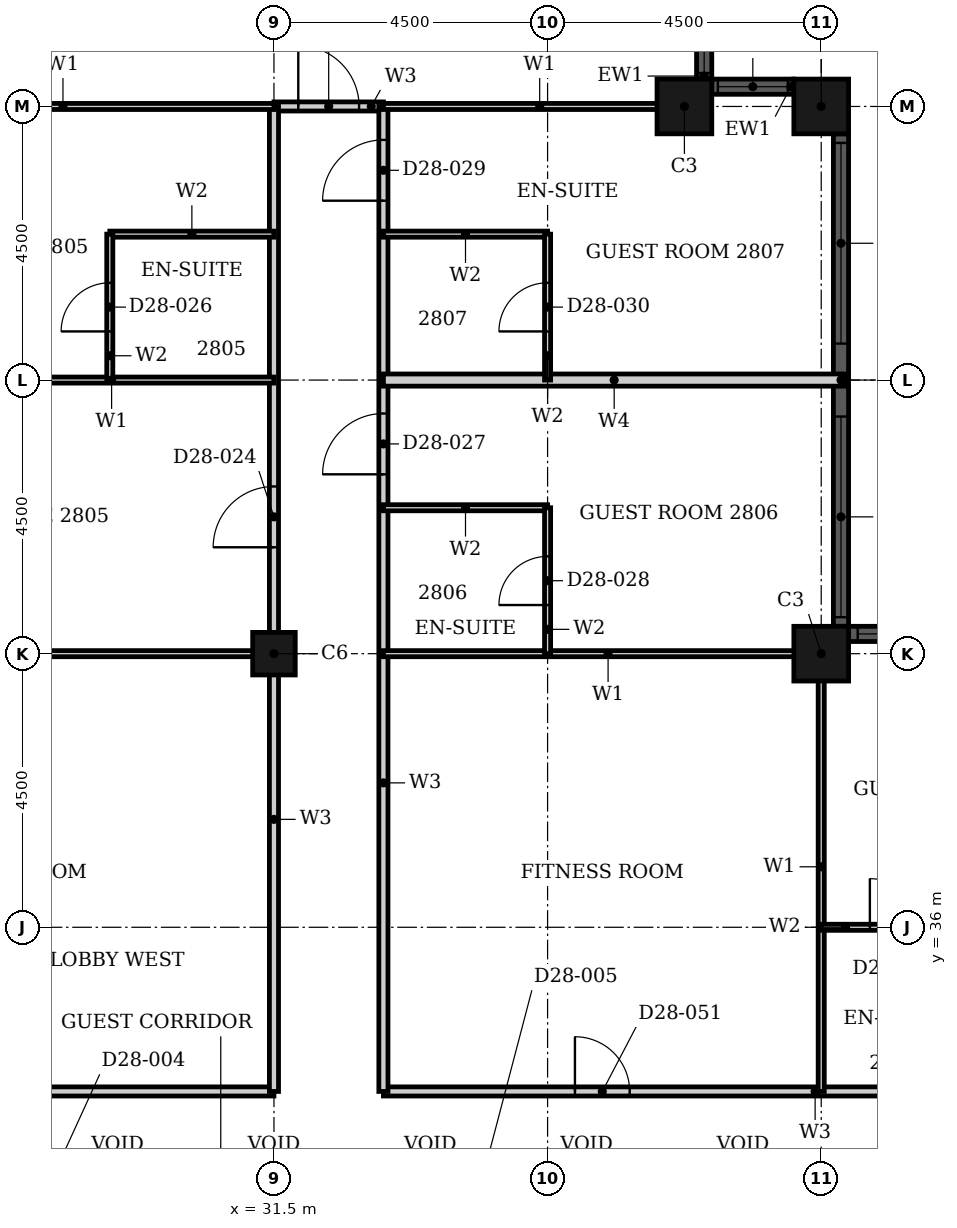
"""IFC4 building model, lengths in metres.
Left out: names, types, materials, properties, quantities, classifications, styles, units other than length and angle.
Written with IfcOpenShell. Run it as: python <this file> out.ifc"""

import sys

from ifc_helpers import new_model, si_unit, direction, frame, frame_2d, origin, origin_2d, place, context, subcontext, project, spatial, rectangle, hollow_rectangle, extrude, element, fill, save


model = new_model("IFC4")
c1 = context("Model", 3, precision=1e-05, world=origin(), true_north=direction((0.0, 1.0)))
c2 = subcontext(c1, "Body", "Model", "MODEL_VIEW")
j1 = project(units=[si_unit("LENGTHUNIT", "METRE"), si_unit("PLANEANGLEUNIT", "RADIAN")], contexts=[c1])
p1 = place(None, origin())
s1 = spatial("IfcSite", under=j1, at=p1, CompositionType="ELEMENT")
p2 = place(p1, origin())
s2 = spatial("IfcBuilding", under=s1, at=p2, CompositionType="ELEMENT")
p3 = place(p2, frame((0.0, 0.0, 115.2)))
s3 = spatial("IfcBuildingStorey", under=s2, at=p3, CompositionType="ELEMENT", Elevation=115.2)
for number, where, z_axis, x_axis in (
    (1, (40.5, 40.5, 0.0), (0.0, 0.0, 1.0), (1.0, 0.0, 0.0)),
    (2, (40.5, 49.5, 0.0), (0.0, 0.0, 1.0), (1.0, 0.0, 0.0)),
    (3, (38.25, 49.5, 0.0), (0.0, 0.0, 1.0), (1.0, 0.0, 0.0)),
):
    element("IfcColumn", number, at=place(p3, frame(where, z_axis=z_axis, x_axis=x_axis)), inside=s3, PredefinedType="COLUMN", context=c2, shape_type="SweptSolid", body=[
        extrude(hollow_rectangle(XDim=0.9, YDim=0.9, WallThickness=0.028, at=origin_2d()), origin(), (0.0, 0.0, 1.0), 3.6),
    ])
p4 = place(p3, frame((31.5, 40.5, 0.0), z_axis=(0.0, 0.0, 1.0), x_axis=(1.0, 0.0, 0.0)))
e4 = element("IfcColumn", 4, at=p4, inside=s3, PredefinedType="COLUMN", context=c2, shape_type="SweptSolid", body=[
    extrude(hollow_rectangle(XDim=0.7, YDim=0.7, WallThickness=0.022, at=origin_2d()), origin(), (0.0, 0.0, 1.0), 3.6),
])
p5 = place(p3, frame((44.55, 40.825, 0.0), z_axis=(0.0, 0.0, 1.0), x_axis=(-1.0, 0.0, 0.0)))
e5 = element("IfcWall", 5, at=p5, inside=s3, PredefinedType="SOLIDWALL", context=c2, shape_type="SweptSolid", body=[
    extrude(rectangle(XDim=3.6, YDim=0.25, at=frame_2d((1.8, 0.0))), origin(), (0.0, 0.0, 1.0), 3.6),
])
p6 = place(p5, frame((0.15, 0.0, 0.9)))
e6 = element("IfcOpeningElement", 6, at=p6, cuts=e5, PredefinedType="OPENING", context=c2, shape_type="SweptSolid", body=[
    extrude(rectangle(XDim=3.3, YDim=2.08, at=frame_2d((1.65, 1.04))), frame((0.0, 0.135, 0.0), z_axis=(0.0, -1.0, 0.0), x_axis=(1.0, 0.0, 0.0)), (0.0, 0.0, 1.0), 0.27),
])
p7 = place(p3, frame((40.825, 40.95, 0.0), z_axis=(0.0, 0.0, 1.0), x_axis=(0.0, 1.0, 0.0)))
e7 = element("IfcWall", 7, at=p7, inside=s3, PredefinedType="SOLIDWALL", context=c2, shape_type="SweptSolid", body=[
    extrude(rectangle(XDim=8.1, YDim=0.25, at=frame_2d((4.05, 0.0))), origin(), (0.0, 0.0, 1.0), 3.6),
])
p8 = place(p7, frame((0.15, 0.0, 0.9)))
e8 = element("IfcOpeningElement", 8, at=p8, cuts=e7, PredefinedType="OPENING", context=c2, shape_type="SweptSolid", body=[
    extrude(rectangle(XDim=3.3, YDim=2.08, at=frame_2d((1.65, 1.04))), frame((0.0, 0.135, 0.0), z_axis=(0.0, -1.0, 0.0), x_axis=(1.0, 0.0, 0.0)), (0.0, 0.0, 1.0), 0.27),
])
p9 = place(p7, frame((4.65, 0.0, 0.9)))
e9 = element("IfcOpeningElement", 9, at=p9, cuts=e7, PredefinedType="OPENING", context=c2, shape_type="SweptSolid", body=[
    extrude(rectangle(XDim=3.3, YDim=2.08, at=frame_2d((1.65, 1.04))), frame((0.0, 0.135, 0.0), z_axis=(0.0, -1.0, 0.0), x_axis=(1.0, 0.0, 0.0)), (0.0, 0.0, 1.0), 0.27),
])
p10 = place(p3, frame((40.05, 49.825, 0.0), z_axis=(0.0, 0.0, 1.0), x_axis=(-1.0, 0.0, 0.0)))
e10 = element("IfcWall", 10, at=p10, inside=s3, PredefinedType="SOLIDWALL", context=c2, shape_type="SweptSolid", body=[
    extrude(rectangle(XDim=1.35, YDim=0.25, at=frame_2d((0.675, 0.0))), origin(), (0.0, 0.0, 1.0), 3.6),
])
p11 = place(p10, frame((0.1, 0.0, 0.9)))
e11 = element("IfcOpeningElement", 11, at=p11, cuts=e10, PredefinedType="OPENING", context=c2, shape_type="SweptSolid", body=[
    extrude(rectangle(XDim=1.15, YDim=2.08, at=frame_2d((0.575, 1.04))), frame((0.0, 0.135, 0.0), z_axis=(0.0, -1.0, 0.0), x_axis=(1.0, 0.0, 0.0)), (0.0, 0.0, 1.0), 0.27),
])
p12 = place(p3, frame((38.575, 49.95, 0.0), z_axis=(0.0, 0.0, 1.0), x_axis=(0.0, 1.0, 0.0)))
e12 = element("IfcWall", 12, at=p12, inside=s3, PredefinedType="SOLIDWALL", context=c2, shape_type="SweptSolid", body=[
    extrude(rectangle(XDim=1.35, YDim=0.25, at=frame_2d((0.675, 0.0))), origin(), (0.0, 0.0, 1.0), 3.6),
])
p13 = place(p12, frame((0.1, 0.0, 0.9)))
e13 = element("IfcOpeningElement", 13, at=p13, cuts=e12, PredefinedType="OPENING", context=c2, shape_type="SweptSolid", body=[
    extrude(rectangle(XDim=1.15, YDim=2.08, at=frame_2d((0.575, 1.04))), frame((0.0, 0.135, 0.0), z_axis=(0.0, -1.0, 0.0), x_axis=(1.0, 0.0, 0.0)), (0.0, 0.0, 1.0), 0.27),
])
p14 = place(p3, frame((33.3, 33.3, 0.0), z_axis=(0.0, 0.0, 1.0), x_axis=(1.0, 0.0, 0.0)))
e14 = element("IfcWall", 14, at=p14, inside=s3, PredefinedType="PARTITIONING", context=c2, shape_type="SweptSolid", body=[
    extrude(rectangle(XDim=11.7, YDim=0.15, at=frame_2d((5.85, 0.0))), origin(), (0.0, 0.0, 1.0), 3.3),
])
p15 = place(p14, frame((10.15, 0.0, 0.0)))
e15 = element("IfcOpeningElement", 15, at=p15, cuts=e14, PredefinedType="OPENING", context=c2, shape_type="SweptSolid", body=[
    extrude(rectangle(XDim=1.0, YDim=2.1, at=frame_2d((0.5, 1.05))), frame((0.0, 0.085, 0.0), z_axis=(0.0, -1.0, 0.0), x_axis=(1.0, 0.0, 0.0)), (0.0, 0.0, 1.0), 0.17),
])
p16 = place(p14, frame((3.15, 0.0, 0.0)))
e16 = element("IfcOpeningElement", 16, at=p16, cuts=e14, PredefinedType="OPENING", context=c2, shape_type="SweptSolid", body=[
    extrude(rectangle(XDim=0.9, YDim=2.1, at=frame_2d((0.45, 1.05))), frame((0.0, 0.085, 0.0), z_axis=(0.0, -1.0, 0.0), x_axis=(1.0, 0.0, 0.0)), (0.0, 0.0, 1.0), 0.17),
])
p17 = place(p3, frame((16.2, 33.3, 0.0), z_axis=(0.0, 0.0, 1.0), x_axis=(1.0, 0.0, 0.0)))
e17 = element("IfcWall", 17, at=p17, inside=s3, PredefinedType="PARTITIONING", context=c2, shape_type="SweptSolid", body=[
    extrude(rectangle(XDim=15.3, YDim=0.15, at=frame_2d((7.65, 0.0))), origin(), (0.0, 0.0, 1.0), 3.3),
])
p18 = place(p17, frame((4.75, 0.0, 0.0)))
e18 = element("IfcOpeningElement", 18, at=p18, cuts=e17, PredefinedType="OPENING", context=c2, shape_type="SweptSolid", body=[
    extrude(rectangle(XDim=1.0, YDim=2.1, at=frame_2d((0.5, 1.05))), frame((0.0, 0.085, 0.0), z_axis=(0.0, -1.0, 0.0), x_axis=(1.0, 0.0, 0.0)), (0.0, 0.0, 1.0), 0.17),
])
p19 = place(p17, frame((0.45, 0.0, 0.0)))
e19 = element("IfcOpeningElement", 19, at=p19, cuts=e17, PredefinedType="OPENING", context=c2, shape_type="SweptSolid", body=[
    extrude(rectangle(XDim=0.9, YDim=2.1, at=frame_2d((0.45, 1.05))), frame((0.0, 0.085, 0.0), z_axis=(0.0, -1.0, 0.0), x_axis=(1.0, 0.0, 0.0)), (0.0, 0.0, 1.0), 0.17),
])
p20 = place(p17, frame((10.35, 0.0, 0.0)))
e20 = element("IfcOpeningElement", 20, at=p20, cuts=e17, PredefinedType="OPENING", context=c2, shape_type="SweptSolid", body=[
    extrude(rectangle(XDim=0.9, YDim=2.1, at=frame_2d((0.45, 1.05))), frame((0.0, 0.085, 0.0), z_axis=(0.0, -1.0, 0.0), x_axis=(1.0, 0.0, 0.0)), (0.0, 0.0, 1.0), 0.17),
])
p21 = place(p3, frame((31.5, 49.5, 0.0), z_axis=(0.0, 0.0, 1.0), x_axis=(1.0, 0.0, 0.0)))
e21 = element("IfcWall", 21, at=p21, inside=s3, PredefinedType="PARTITIONING", context=c2, shape_type="SweptSolid", body=[
    extrude(rectangle(XDim=1.8, YDim=0.15, at=frame_2d((0.9, 0.0))), origin(), (0.0, 0.0, 1.0), 3.3),
])
p22 = place(p21, frame((0.4, 0.0, 0.0)))
e22 = element("IfcOpeningElement", 22, at=p22, cuts=e21, PredefinedType="OPENING", context=c2, shape_type="SweptSolid", body=[
    extrude(rectangle(XDim=1.0, YDim=2.1, at=frame_2d((0.5, 1.05))), frame((0.0, 0.085, 0.0), z_axis=(0.0, -1.0, 0.0), x_axis=(1.0, 0.0, 0.0)), (0.0, 0.0, 1.0), 0.17),
])
p23 = place(p3, frame((31.5, 33.3, 0.0), z_axis=(0.0, 0.0, 1.0), x_axis=(0.0, 1.0, 0.0)))
e23 = element("IfcWall", 23, at=p23, inside=s3, PredefinedType="PARTITIONING", context=c2, shape_type="SweptSolid", body=[
    extrude(rectangle(XDim=16.2, YDim=0.15, at=frame_2d((8.1, 0.0))), origin(), (0.0, 0.0, 1.0), 2.58),
])
p24 = place(p23, frame((8.95, 0.0, 0.0)))
e24 = element("IfcOpeningElement", 24, at=p24, cuts=e23, PredefinedType="OPENING", context=c2, shape_type="SweptSolid", body=[
    extrude(rectangle(XDim=1.0, YDim=2.1, at=frame_2d((0.5, 1.05))), frame((0.0, 0.085, 0.0), z_axis=(0.0, -1.0, 0.0), x_axis=(1.0, 0.0, 0.0)), (0.0, 0.0, 1.0), 0.17),
])
p25 = place(p3, frame((33.3, 33.3, 0.0), z_axis=(0.0, 0.0, 1.0), x_axis=(0.0, 1.0, 0.0)))
e25 = element("IfcWall", 25, at=p25, inside=s3, PredefinedType="PARTITIONING", context=c2, shape_type="SweptSolid", body=[
    extrude(rectangle(XDim=16.2, YDim=0.15, at=frame_2d((8.1, 0.0))), origin(), (0.0, 0.0, 1.0), 3.3),
])
p26 = place(p25, frame((10.15, 0.0, 0.0)))
e26 = element("IfcOpeningElement", 26, at=p26, cuts=e25, PredefinedType="OPENING", context=c2, shape_type="SweptSolid", body=[
    extrude(rectangle(XDim=1.0, YDim=2.1, at=frame_2d((0.5, 1.05))), frame((0.0, 0.085, 0.0), z_axis=(0.0, -1.0, 0.0), x_axis=(1.0, 0.0, 0.0)), (0.0, 0.0, 1.0), 0.17),
])
p27 = place(p25, frame((14.65, 0.0, 0.0)))
e27 = element("IfcOpeningElement", 27, at=p27, cuts=e25, PredefinedType="OPENING", context=c2, shape_type="SweptSolid", body=[
    extrude(rectangle(XDim=1.0, YDim=2.1, at=frame_2d((0.5, 1.05))), frame((0.0, 0.085, 0.0), z_axis=(0.0, -1.0, 0.0), x_axis=(1.0, 0.0, 0.0)), (0.0, 0.0, 1.0), 0.17),
])
p28 = place(p3, frame((33.3, 40.5, 0.0), z_axis=(0.0, 0.0, 1.0), x_axis=(1.0, 0.0, 0.0)))
e28 = element("IfcWall", 28, at=p28, inside=s3, PredefinedType="PARTITIONING", context=c2, shape_type="SweptSolid", body=[
    extrude(rectangle(XDim=7.39, YDim=0.1, at=frame_2d((3.695, 0.0))), origin(), (0.0, 0.0, 1.0), 2.38),
])
p29 = place(p3, frame((22.31, 40.5, 0.0), z_axis=(0.0, 0.0, 1.0), x_axis=(1.0, 0.0, 0.0)))
e29 = element("IfcWall", 29, at=p29, inside=s3, PredefinedType="PARTITIONING", context=c2, shape_type="SweptSolid", body=[
    extrude(rectangle(XDim=9.19, YDim=0.1, at=frame_2d((4.595, 0.0))), origin(), (0.0, 0.0, 1.0), 2.38),
])
p30 = place(p3, frame((22.11, 45.0, 0.0), z_axis=(0.0, 0.0, 1.0), x_axis=(1.0, 0.0, 0.0)))
e30 = element("IfcWall", 30, at=p30, inside=s3, PredefinedType="PARTITIONING", context=c2, shape_type="SweptSolid", body=[
    extrude(rectangle(XDim=9.39, YDim=0.1, at=frame_2d((4.695, 0.0))), origin(), (0.0, 0.0, 1.0), 3.3),
])
p31 = place(p30, frame((3.15, 0.0, 0.0)))
e31 = element("IfcOpeningElement", 31, at=p31, cuts=e30, PredefinedType="OPENING", context=c2, shape_type="SweptSolid", body=[
    extrude(rectangle(XDim=0.9, YDim=2.1, at=frame_2d((0.45, 1.05))), frame((0.0, 0.06, 0.0), z_axis=(0.0, -1.0, 0.0), x_axis=(1.0, 0.0, 0.0)), (0.0, 0.0, 1.0), 0.12),
])
p32 = place(p3, frame((33.3, 49.5, 0.0), z_axis=(0.0, 0.0, 1.0), x_axis=(1.0, 0.0, 0.0)))
e32 = element("IfcWall", 32, at=p32, inside=s3, PredefinedType="PARTITIONING", context=c2, shape_type="SweptSolid", body=[
    extrude(rectangle(XDim=5.14, YDim=0.1, at=frame_2d((2.57, 0.0))), origin(), (0.0, 0.0, 1.0), 3.3),
])
p33 = place(p3, frame((24.56, 49.5, 0.0), z_axis=(0.0, 0.0, 1.0), x_axis=(1.0, 0.0, 0.0)))
e33 = element("IfcWall", 33, at=p33, inside=s3, PredefinedType="PARTITIONING", context=c2, shape_type="SweptSolid", body=[
    extrude(rectangle(XDim=6.94, YDim=0.1, at=frame_2d((3.47, 0.0))), origin(), (0.0, 0.0, 1.0), 3.3),
])
p34 = place(p3, frame((40.5, 33.3, 0.0), z_axis=(0.0, 0.0, 1.0), x_axis=(0.0, 1.0, 0.0)))
e34 = element("IfcWall", 34, at=p34, inside=s3, PredefinedType="PARTITIONING", context=c2, shape_type="SweptSolid", body=[
    extrude(rectangle(XDim=7.39, YDim=0.1, at=frame_2d((3.695, 0.0))), origin(), (0.0, 0.0, 1.0), 3.3),
])
p35 = place(p3, frame((33.3, 45.0, 0.0), z_axis=(0.0, 0.0, 1.0), x_axis=(1.0, 0.0, 0.0)))
e35 = element("IfcWall", 35, at=p35, inside=s3, PredefinedType="PARTITIONING", context=c2, shape_type="SweptSolid", body=[
    extrude(rectangle(XDim=7.59, YDim=0.2, at=frame_2d((3.795, 0.0))), origin(), (0.0, 0.0, 1.0), 3.3),
])
p36 = place(p3, frame((40.5, 36.0, 0.0), z_axis=(0.0, 0.0, 1.0), x_axis=(1.0, 0.0, 0.0)))
e36 = element("IfcWall", 36, at=p36, inside=s3, PredefinedType="PARTITIONING", context=c2, shape_type="SweptSolid", body=[
    extrude(rectangle(XDim=2.4, YDim=0.1, at=frame_2d((1.2, 0.0))), origin(), (0.0, 0.0, 1.0), 3.3),
])
p37 = place(p36, frame((0.8, 0.0, 0.0)))
e37 = element("IfcOpeningElement", 37, at=p37, cuts=e36, PredefinedType="OPENING", context=c2, shape_type="SweptSolid", body=[
    extrude(rectangle(XDim=0.8, YDim=2.1, at=frame_2d((0.4, 1.05))), frame((0.0, 0.06, 0.0), z_axis=(0.0, -1.0, 0.0), x_axis=(1.0, 0.0, 0.0)), (0.0, 0.0, 1.0), 0.12),
])
for number, where, z_axis, x_axis in (
    (38, (33.3, 42.9, 0.0), (0.0, 0.0, 1.0), (1.0, 0.0, 0.0)),
    (39, (33.3, 47.4, 0.0), (0.0, 0.0, 1.0), (1.0, 0.0, 0.0)),
    (40, (28.8, 47.4, 0.0), (0.0, 0.0, 1.0), (1.0, 0.0, 0.0)),
):
    element("IfcWall", number, at=place(p3, frame(where, z_axis=z_axis, x_axis=x_axis)), inside=s3, PredefinedType="PARTITIONING", context=c2, shape_type="SweptSolid", body=[
        extrude(rectangle(XDim=2.7, YDim=0.1, at=frame_2d((1.35, 0.0))), origin(), (0.0, 0.0, 1.0), 3.3),
    ])
p38 = place(p3, frame((28.8, 45.0, 0.0), z_axis=(0.0, 0.0, 1.0), x_axis=(0.0, 1.0, 0.0)))
e41 = element("IfcWall", 41, at=p38, inside=s3, PredefinedType="PARTITIONING", context=c2, shape_type="SweptSolid", body=[
    extrude(rectangle(XDim=2.4, YDim=0.1, at=frame_2d((1.2, 0.0))), origin(), (0.0, 0.0, 1.0), 3.3),
])
p39 = place(p38, frame((0.8, 0.0, 0.0)))
e42 = element("IfcOpeningElement", 42, at=p39, cuts=e41, PredefinedType="OPENING", context=c2, shape_type="SweptSolid", body=[
    extrude(rectangle(XDim=0.8, YDim=2.1, at=frame_2d((0.4, 1.05))), frame((0.0, 0.06, 0.0), z_axis=(0.0, -1.0, 0.0), x_axis=(1.0, 0.0, 0.0)), (0.0, 0.0, 1.0), 0.12),
])
p40 = place(p3, frame((36.0, 40.5, 0.0), z_axis=(0.0, 0.0, 1.0), x_axis=(0.0, 1.0, 0.0)))
e43 = element("IfcWall", 43, at=p40, inside=s3, PredefinedType="PARTITIONING", context=c2, shape_type="SweptSolid", body=[
    extrude(rectangle(XDim=2.4, YDim=0.1, at=frame_2d((1.2, 0.0))), origin(), (0.0, 0.0, 1.0), 2.58),
])
p41 = place(p40, frame((0.8, 0.0, 0.0)))
e44 = element("IfcOpeningElement", 44, at=p41, cuts=e43, PredefinedType="OPENING", context=c2, shape_type="SweptSolid", body=[
    extrude(rectangle(XDim=0.8, YDim=2.1, at=frame_2d((0.4, 1.05))), frame((0.0, 0.06, 0.0), z_axis=(0.0, -1.0, 0.0), x_axis=(1.0, 0.0, 0.0)), (0.0, 0.0, 1.0), 0.12),
])
p42 = place(p3, frame((36.0, 45.0, 0.0), z_axis=(0.0, 0.0, 1.0), x_axis=(0.0, 1.0, 0.0)))
e45 = element("IfcWall", 45, at=p42, inside=s3, PredefinedType="PARTITIONING", context=c2, shape_type="SweptSolid", body=[
    extrude(rectangle(XDim=2.4, YDim=0.1, at=frame_2d((1.2, 0.0))), origin(), (0.0, 0.0, 1.0), 2.58),
])
p43 = place(p42, frame((0.8, 0.0, 0.0)))
e46 = element("IfcOpeningElement", 46, at=p43, cuts=e45, PredefinedType="OPENING", context=c2, shape_type="SweptSolid", body=[
    extrude(rectangle(XDim=0.8, YDim=2.1, at=frame_2d((0.4, 1.05))), frame((0.0, 0.06, 0.0), z_axis=(0.0, -1.0, 0.0), x_axis=(1.0, 0.0, 0.0)), (0.0, 0.0, 1.0), 0.12),
])
p44 = place(p6, origin())
e47 = element("IfcWindow", 47, at=p44, inside=s3, PartitioningType="SINGLE_PANEL", PredefinedType="WINDOW", context=c2, shape_type="SweptSolid", body=[
    extrude(rectangle(XDim=3.3, YDim=2.08, at=frame_2d((1.65, 1.04))), frame((0.0, 0.03, 0.0), z_axis=(0.0, -1.0, 0.0), x_axis=(1.0, 0.0, 0.0)), (0.0, 0.0, 1.0), 0.06),
])
fill(e6, e47)
p45 = place(p8, origin())
e48 = element("IfcWindow", 48, at=p45, inside=s3, PartitioningType="SINGLE_PANEL", PredefinedType="WINDOW", context=c2, shape_type="SweptSolid", body=[
    extrude(rectangle(XDim=3.3, YDim=2.08, at=frame_2d((1.65, 1.04))), frame((0.0, 0.03, 0.0), z_axis=(0.0, -1.0, 0.0), x_axis=(1.0, 0.0, 0.0)), (0.0, 0.0, 1.0), 0.06),
])
fill(e8, e48)
p46 = place(p9, origin())
e49 = element("IfcWindow", 49, at=p46, inside=s3, PartitioningType="SINGLE_PANEL", PredefinedType="WINDOW", context=c2, shape_type="SweptSolid", body=[
    extrude(rectangle(XDim=3.3, YDim=2.08, at=frame_2d((1.65, 1.04))), frame((0.0, 0.03, 0.0), z_axis=(0.0, -1.0, 0.0), x_axis=(1.0, 0.0, 0.0)), (0.0, 0.0, 1.0), 0.06),
])
fill(e9, e49)
p47 = place(p11, origin())
e50 = element("IfcWindow", 50, at=p47, inside=s3, PartitioningType="SINGLE_PANEL", PredefinedType="WINDOW", context=c2, shape_type="SweptSolid", body=[
    extrude(rectangle(XDim=1.15, YDim=2.08, at=frame_2d((0.575, 1.04))), frame((0.0, 0.03, 0.0), z_axis=(0.0, -1.0, 0.0), x_axis=(1.0, 0.0, 0.0)), (0.0, 0.0, 1.0), 0.06),
])
fill(e11, e50)
p48 = place(p13, origin())
e51 = element("IfcWindow", 51, at=p48, inside=s3, PartitioningType="SINGLE_PANEL", PredefinedType="WINDOW", context=c2, shape_type="SweptSolid", body=[
    extrude(rectangle(XDim=1.15, YDim=2.08, at=frame_2d((0.575, 1.04))), frame((0.0, 0.03, 0.0), z_axis=(0.0, -1.0, 0.0), x_axis=(1.0, 0.0, 0.0)), (0.0, 0.0, 1.0), 0.06),
])
fill(e13, e51)
p49 = place(p24, origin())
e52 = element("IfcDoor", 52, at=p49, inside=s3, OperationType="SINGLE_SWING_LEFT", PredefinedType="DOOR", context=c2, shape_type="SweptSolid", body=[
    extrude(rectangle(XDim=1.0, YDim=2.1, at=frame_2d((0.5, 1.05))), frame((0.0, 0.025, 0.0), z_axis=(0.0, -1.0, 0.0), x_axis=(1.0, 0.0, 0.0)), (0.0, 0.0, 1.0), 0.05),
])
fill(e24, e52)
p50 = place(p39, origin())
e53 = element("IfcDoor", 53, at=p50, inside=s3, OperationType="SINGLE_SWING_RIGHT", PredefinedType="DOOR", context=c2, shape_type="SweptSolid", body=[
    extrude(rectangle(XDim=0.8, YDim=2.1, at=frame_2d((0.4, 1.05))), frame((0.0, 0.025, 0.0), z_axis=(0.0, -1.0, 0.0), x_axis=(1.0, 0.0, 0.0)), (0.0, 0.0, 1.0), 0.05),
])
fill(e42, e53)
p51 = place(p26, origin())
e54 = element("IfcDoor", 54, at=p51, inside=s3, OperationType="SINGLE_SWING_RIGHT", PredefinedType="DOOR", context=c2, shape_type="SweptSolid", body=[
    extrude(rectangle(XDim=1.0, YDim=2.1, at=frame_2d((0.5, 1.05))), frame((0.0, 0.025, 0.0), z_axis=(0.0, -1.0, 0.0), x_axis=(1.0, 0.0, 0.0)), (0.0, 0.0, 1.0), 0.05),
])
fill(e26, e54)
p52 = place(p41, origin())
e55 = element("IfcDoor", 55, at=p52, inside=s3, OperationType="SINGLE_SWING_RIGHT", PredefinedType="DOOR", context=c2, shape_type="SweptSolid", body=[
    extrude(rectangle(XDim=0.8, YDim=2.1, at=frame_2d((0.4, 1.05))), frame((0.0, 0.025, 0.0), z_axis=(0.0, -1.0, 0.0), x_axis=(1.0, 0.0, 0.0)), (0.0, 0.0, 1.0), 0.05),
])
fill(e44, e55)
p53 = place(p27, origin())
e56 = element("IfcDoor", 56, at=p53, inside=s3, OperationType="SINGLE_SWING_RIGHT", PredefinedType="DOOR", context=c2, shape_type="SweptSolid", body=[
    extrude(rectangle(XDim=1.0, YDim=2.1, at=frame_2d((0.5, 1.05))), frame((0.0, 0.025, 0.0), z_axis=(0.0, -1.0, 0.0), x_axis=(1.0, 0.0, 0.0)), (0.0, 0.0, 1.0), 0.05),
])
fill(e27, e56)
p54 = place(p43, origin())
e57 = element("IfcDoor", 57, at=p54, inside=s3, OperationType="SINGLE_SWING_LEFT", PredefinedType="DOOR", context=c2, shape_type="SweptSolid", body=[
    extrude(rectangle(XDim=0.8, YDim=2.1, at=frame_2d((0.4, 1.05))), frame((0.0, 0.025, 0.0), z_axis=(0.0, -1.0, 0.0), x_axis=(1.0, 0.0, 0.0)), (0.0, 0.0, 1.0), 0.05),
])
fill(e46, e57)
p55 = place(p22, origin())
e58 = element("IfcDoor", 58, at=p55, inside=s3, OperationType="SINGLE_SWING_RIGHT", PredefinedType="DOOR", context=c2, shape_type="SweptSolid", body=[
    extrude(rectangle(XDim=1.0, YDim=2.1, at=frame_2d((0.5, 1.05))), frame((0.0, 0.025, 0.0), z_axis=(0.0, -1.0, 0.0), x_axis=(1.0, 0.0, 0.0)), (0.0, 0.0, 1.0), 0.05),
])
fill(e22, e58)
p56 = place(p37, origin())
e59 = element("IfcDoor", 59, at=p56, inside=s3, OperationType="SINGLE_SWING_RIGHT", PredefinedType="DOOR", context=c2, shape_type="SweptSolid", body=[
    extrude(rectangle(XDim=0.8, YDim=2.1, at=frame_2d((0.4, 1.05))), frame((0.0, 0.025, 0.0), z_axis=(0.0, -1.0, 0.0), x_axis=(1.0, 0.0, 0.0)), (0.0, 0.0, 1.0), 0.05),
])
fill(e37, e59)
p57 = place(p16, origin())
e60 = element("IfcDoor", 60, at=p57, inside=s3, OperationType="SINGLE_SWING_LEFT", PredefinedType="DOOR", context=c2, shape_type="SweptSolid", body=[
    extrude(rectangle(XDim=0.9, YDim=2.1, at=frame_2d((0.45, 1.05))), frame((0.0, 0.025, 0.0), z_axis=(0.0, -1.0, 0.0), x_axis=(1.0, 0.0, 0.0)), (0.0, 0.0, 1.0), 0.05),
])
fill(e16, e60)
save(model, sys.argv[1])
